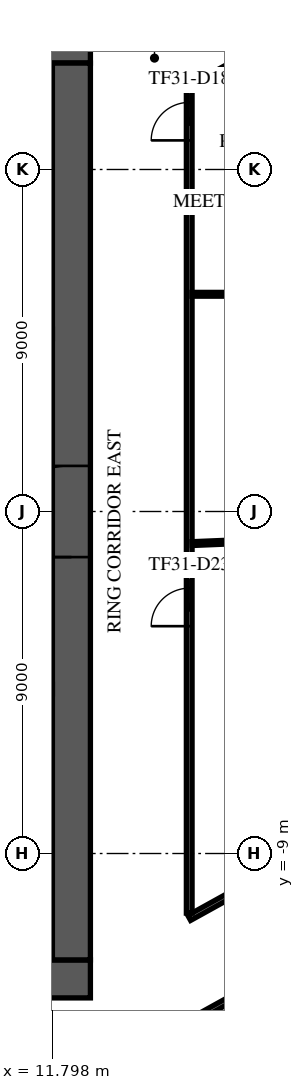
"""IFC4 building model, lengths in metres.
Left out: names, types, materials, properties, quantities, classifications, styles, units other than length and angle.
Written with IfcOpenShell. Run it as: python <this file> out.ifc"""

import sys

from ifc_helpers import new_model, si_unit, direction, frame, frame_2d, origin, place, context, subcontext, project, spatial, rectangle, extrude, element, fill, save


model = new_model("IFC4")
c1 = context("Model", 3, precision=1e-05, world=origin(), true_north=direction((0.0, 1.0)))
c2 = subcontext(c1, "Body", "Model", "MODEL_VIEW")
j1 = project(units=[si_unit("LENGTHUNIT", "METRE"), si_unit("PLANEANGLEUNIT", "RADIAN")], contexts=[c1])
p1 = place(None, origin())
s1 = spatial("IfcSite", under=j1, at=p1, CompositionType="ELEMENT")
p2 = place(p1, origin())
s2 = spatial("IfcBuilding", under=s1, at=p2, CompositionType="ELEMENT")
p3 = place(p2, frame((0.0, 0.0, 139.7)))
s3 = spatial("IfcBuildingStorey", under=s2, at=p3, CompositionType="ELEMENT", Elevation=139.7)
p4 = place(p3, frame((-12.8, 12.3, 0.0), z_axis=(0.0, 0.0, 1.0), x_axis=(1.0, 0.0, 0.0)))
e1 = element("IfcWall", 1, at=p4, inside=s3, PredefinedType="SHEAR", context=c2, shape_type="SweptSolid", body=[
    extrude(rectangle(XDim=25.6, YDim=1.0, at=frame_2d((12.8, 0.0))), origin(), (0.0, 0.0, 1.0), 3.6),
])
p5 = place(p4, frame((11.6, 0.0, 0.0)))
e2 = element("IfcOpeningElement", 2, at=p5, cuts=e1, PredefinedType="OPENING", context=c2, shape_type="SweptSolid", body=[
    extrude(rectangle(XDim=2.4, YDim=2.4, at=frame_2d((1.2, 1.2))), frame((0.0, 0.51, 0.0), z_axis=(0.0, -1.0, 0.0), x_axis=(1.0, 0.0, 0.0)), (0.0, 0.0, 1.0), 1.02),
])
p6 = place(p4, frame((22.425, 0.0, 0.0)))
e3 = element("IfcOpeningElement", 3, at=p6, cuts=e1, PredefinedType="OPENING", context=c2, shape_type="SweptSolid", body=[
    extrude(rectangle(XDim=1.2, YDim=2.1, at=frame_2d((0.6, 1.05))), frame((0.0, 0.51, 0.0), z_axis=(0.0, -1.0, 0.0), x_axis=(1.0, 0.0, 0.0)), (0.0, 0.0, 1.0), 1.02),
])
p7 = place(p4, frame((1.4, 0.0, 0.0)))
e4 = element("IfcOpeningElement", 4, at=p7, cuts=e1, PredefinedType="OPENING", context=c2, shape_type="SweptSolid", body=[
    extrude(rectangle(XDim=1.0, YDim=2.1, at=frame_2d((0.5, 1.05))), frame((0.0, 0.51, 0.0), z_axis=(0.0, -1.0, 0.0), x_axis=(1.0, 0.0, 0.0)), (0.0, 0.0, 1.0), 1.02),
])
p8 = place(p3, frame((-12.8, -12.3, 0.0), z_axis=(0.0, 0.0, 1.0), x_axis=(1.0, 0.0, 0.0)))
e5 = element("IfcWall", 5, at=p8, inside=s3, PredefinedType="SHEAR", context=c2, shape_type="SweptSolid", body=[
    extrude(rectangle(XDim=25.6, YDim=1.0, at=frame_2d((12.8, 0.0))), origin(), (0.0, 0.0, 1.0), 3.6),
])
p9 = place(p8, frame((7.7, 0.0, 0.0)))
e6 = element("IfcOpeningElement", 6, at=p9, cuts=e5, PredefinedType="OPENING", context=c2, shape_type="SweptSolid", body=[
    extrude(rectangle(XDim=2.0, YDim=2.1, at=frame_2d((1.0, 1.05))), frame((0.0, 0.51, 0.0), z_axis=(0.0, -1.0, 0.0), x_axis=(1.0, 0.0, 0.0)), (0.0, 0.0, 1.0), 1.02),
])
p10 = place(p8, frame((17.825, 0.0, 0.0)))
e7 = element("IfcOpeningElement", 7, at=p10, cuts=e5, PredefinedType="OPENING", context=c2, shape_type="SweptSolid", body=[
    extrude(rectangle(XDim=1.2, YDim=2.1, at=frame_2d((0.6, 1.05))), frame((0.0, 0.51, 0.0), z_axis=(0.0, -1.0, 0.0), x_axis=(1.0, 0.0, 0.0)), (0.0, 0.0, 1.0), 1.02),
])
p11 = place(p8, frame((1.975, 0.0, 0.0)))
e8 = element("IfcOpeningElement", 8, at=p11, cuts=e5, PredefinedType="OPENING", context=c2, shape_type="SweptSolid", body=[
    extrude(rectangle(XDim=1.2, YDim=2.1, at=frame_2d((0.6, 1.05))), frame((0.0, 0.51, 0.0), z_axis=(0.0, -1.0, 0.0), x_axis=(1.0, 0.0, 0.0)), (0.0, 0.0, 1.0), 1.02),
])
p12 = place(p8, frame((22.425, 0.0, 0.0)))
e9 = element("IfcOpeningElement", 9, at=p12, cuts=e5, PredefinedType="OPENING", context=c2, shape_type="SweptSolid", body=[
    extrude(rectangle(XDim=1.2, YDim=2.1, at=frame_2d((0.6, 1.05))), frame((0.0, 0.51, 0.0), z_axis=(0.0, -1.0, 0.0), x_axis=(1.0, 0.0, 0.0)), (0.0, 0.0, 1.0), 1.02),
])
p13 = place(p3, frame((12.3, -11.8, 0.0), z_axis=(0.0, 0.0, 1.0), x_axis=(0.0, 1.0, 0.0)))
e10 = element("IfcWall", 10, at=p13, inside=s3, PredefinedType="SHEAR", context=c2, shape_type="SweptSolid", body=[
    extrude(rectangle(XDim=23.6, YDim=1.0, at=frame_2d((11.8, 0.0))), origin(), (0.0, 0.0, 1.0), 3.6),
])
p14 = place(p13, frame((10.6, 0.0, 0.0)))
e11 = element("IfcOpeningElement", 11, at=p14, cuts=e10, PredefinedType="OPENING", context=c2, shape_type="SweptSolid", body=[
    extrude(rectangle(XDim=2.4, YDim=2.4, at=frame_2d((1.2, 1.2))), frame((0.0, 0.51, 0.0), z_axis=(0.0, -1.0, 0.0), x_axis=(1.0, 0.0, 0.0)), (0.0, 0.0, 1.0), 1.02),
])
for number, where, z_axis, x_axis in (
    (12, (8.65, 4.675, 0.0), (0.0, 0.0, 1.0), (1.0, 0.0, 0.0)),
    (13, (8.65, -4.675, 0.0), (0.0, 0.0, 1.0), (1.0, 0.0, 0.0)),
):
    element("IfcWall", number, at=place(p3, frame(where, z_axis=z_axis, x_axis=x_axis)), inside=s3, PredefinedType="SOLIDWALL", context=c2, shape_type="SweptSolid", body=[
        extrude(rectangle(XDim=3.15, YDim=0.25, at=frame_2d((1.575, 0.0))), origin(), (0.0, 0.0, 1.0), 3.6),
    ])
p15 = place(p3, frame((-9.103, -34.888, 0.0), z_axis=(0.0, 0.0, 1.0), x_axis=(0.874618897425, 0.484811081007, 0.0)))
e14 = element("IfcWall", 14, at=p15, inside=s3, PredefinedType="STANDARD", context=c2, shape_type="SweptSolid", body=[
    extrude(rectangle(XDim=49.751, YDim=0.6, at=frame_2d((24.876, 0.0))), origin(), (0.0, 0.0, 1.0), 3.6),
])
p16 = place(p15, frame((1.161, 0.0, 0.9)))
e15 = element("IfcOpeningElement", 15, at=p16, cuts=e14, PredefinedType="OPENING", context=c2, shape_type="SweptSolid", body=[
    extrude(rectangle(XDim=2.1, YDim=2.1, at=frame_2d((1.05, 1.05))), frame((0.0, 0.31, 0.0), z_axis=(0.0, -1.0, 0.0), x_axis=(1.0, 0.0, 0.0)), (0.0, 0.0, 1.0), 0.62),
])
p17 = place(p15, frame((5.644, 0.0, 0.9)))
e16 = element("IfcOpeningElement", 16, at=p17, cuts=e14, PredefinedType="OPENING", context=c2, shape_type="SweptSolid", body=[
    extrude(rectangle(XDim=2.1, YDim=2.1, at=frame_2d((1.05, 1.05))), frame((0.0, 0.31, 0.0), z_axis=(0.0, -1.0, 0.0), x_axis=(1.0, 0.0, 0.0)), (0.0, 0.0, 1.0), 0.62),
])
p18 = place(p15, frame((10.189, 0.0, 0.9)))
e17 = element("IfcOpeningElement", 17, at=p18, cuts=e14, PredefinedType="OPENING", context=c2, shape_type="SweptSolid", body=[
    extrude(rectangle(XDim=2.1, YDim=2.1, at=frame_2d((1.05, 1.05))), frame((0.0, 0.31, 0.0), z_axis=(0.0, -1.0, 0.0), x_axis=(1.0, 0.0, 0.0)), (0.0, 0.0, 1.0), 0.62),
])
p19 = place(p15, frame((14.735, 0.0, 0.9)))
e18 = element("IfcOpeningElement", 18, at=p19, cuts=e14, PredefinedType="OPENING", context=c2, shape_type="SweptSolid", body=[
    extrude(rectangle(XDim=2.1, YDim=2.1, at=frame_2d((1.05, 1.05))), frame((0.0, 0.31, 0.0), z_axis=(0.0, -1.0, 0.0), x_axis=(1.0, 0.0, 0.0)), (0.0, 0.0, 1.0), 0.62),
])
p20 = place(p15, frame((19.28, 0.0, 0.9)))
e19 = element("IfcOpeningElement", 19, at=p20, cuts=e14, PredefinedType="OPENING", context=c2, shape_type="SweptSolid", body=[
    extrude(rectangle(XDim=2.1, YDim=2.1, at=frame_2d((1.05, 1.05))), frame((0.0, 0.31, 0.0), z_axis=(0.0, -1.0, 0.0), x_axis=(1.0, 0.0, 0.0)), (0.0, 0.0, 1.0), 0.62),
])
p21 = place(p15, frame((23.826, 0.0, 0.9)))
e20 = element("IfcOpeningElement", 20, at=p21, cuts=e14, PredefinedType="OPENING", context=c2, shape_type="SweptSolid", body=[
    extrude(rectangle(XDim=2.1, YDim=2.1, at=frame_2d((1.05, 1.05))), frame((0.0, 0.31, 0.0), z_axis=(0.0, -1.0, 0.0), x_axis=(1.0, 0.0, 0.0)), (0.0, 0.0, 1.0), 0.62),
])
p22 = place(p15, frame((28.371, 0.0, 0.9)))
e21 = element("IfcOpeningElement", 21, at=p22, cuts=e14, PredefinedType="OPENING", context=c2, shape_type="SweptSolid", body=[
    extrude(rectangle(XDim=2.1, YDim=2.1, at=frame_2d((1.05, 1.05))), frame((0.0, 0.31, 0.0), z_axis=(0.0, -1.0, 0.0), x_axis=(1.0, 0.0, 0.0)), (0.0, 0.0, 1.0), 0.62),
])
p23 = place(p15, frame((32.917, 0.0, 0.9)))
e22 = element("IfcOpeningElement", 22, at=p23, cuts=e14, PredefinedType="OPENING", context=c2, shape_type="SweptSolid", body=[
    extrude(rectangle(XDim=2.1, YDim=2.1, at=frame_2d((1.05, 1.05))), frame((0.0, 0.31, 0.0), z_axis=(0.0, -1.0, 0.0), x_axis=(1.0, 0.0, 0.0)), (0.0, 0.0, 1.0), 0.62),
])
p24 = place(p15, frame((37.462, 0.0, 0.9)))
e23 = element("IfcOpeningElement", 23, at=p24, cuts=e14, PredefinedType="OPENING", context=c2, shape_type="SweptSolid", body=[
    extrude(rectangle(XDim=2.1, YDim=2.1, at=frame_2d((1.05, 1.05))), frame((0.0, 0.31, 0.0), z_axis=(0.0, -1.0, 0.0), x_axis=(1.0, 0.0, 0.0)), (0.0, 0.0, 1.0), 0.62),
])
p25 = place(p15, frame((42.008, 0.0, 0.9)))
e24 = element("IfcOpeningElement", 24, at=p25, cuts=e14, PredefinedType="OPENING", context=c2, shape_type="SweptSolid", body=[
    extrude(rectangle(XDim=2.1, YDim=2.1, at=frame_2d((1.05, 1.05))), frame((0.0, 0.31, 0.0), z_axis=(0.0, -1.0, 0.0), x_axis=(1.0, 0.0, 0.0)), (0.0, 0.0, 1.0), 0.62),
])
p26 = place(p15, frame((46.491, 0.0, 0.9)))
e25 = element("IfcOpeningElement", 25, at=p26, cuts=e14, PredefinedType="OPENING", context=c2, shape_type="SweptSolid", body=[
    extrude(rectangle(XDim=2.1, YDim=2.1, at=frame_2d((1.05, 1.05))), frame((0.0, 0.31, 0.0), z_axis=(0.0, -1.0, 0.0), x_axis=(1.0, 0.0, 0.0)), (0.0, 0.0, 1.0), 0.62),
])
p27 = place(p3, frame((36.291, -4.209, 0.0), z_axis=(0.0, 0.0, 1.0), x_axis=(-0.484811111615, 0.874618880458, 0.0)))
e26 = element("IfcWall", 26, at=p27, inside=s3, PredefinedType="STANDARD", context=c2, shape_type="SweptSolid", body=[
    extrude(rectangle(XDim=42.176, YDim=0.6, at=frame_2d((21.088, 0.0))), origin(), (0.0, 0.0, 1.0), 3.6),
])
p28 = place(p27, frame((1.138, 0.0, 0.9)))
e27 = element("IfcOpeningElement", 27, at=p28, cuts=e26, PredefinedType="OPENING", context=c2, shape_type="SweptSolid", body=[
    extrude(rectangle(XDim=2.3, YDim=2.1, at=frame_2d((1.15, 1.05))), frame((0.0, 0.31, 0.0), z_axis=(0.0, -1.0, 0.0), x_axis=(1.0, 0.0, 0.0)), (0.0, 0.0, 1.0), 0.62),
])
p29 = place(p27, frame((5.776, 0.0, 0.9)))
e28 = element("IfcOpeningElement", 28, at=p29, cuts=e26, PredefinedType="OPENING", context=c2, shape_type="SweptSolid", body=[
    extrude(rectangle(XDim=2.3, YDim=2.1, at=frame_2d((1.15, 1.05))), frame((0.0, 0.31, 0.0), z_axis=(0.0, -1.0, 0.0), x_axis=(1.0, 0.0, 0.0)), (0.0, 0.0, 1.0), 0.62),
])
p30 = place(p27, frame((15.176, 0.0, 0.9)))
e29 = element("IfcOpeningElement", 29, at=p30, cuts=e26, PredefinedType="OPENING", context=c2, shape_type="SweptSolid", body=[
    extrude(rectangle(XDim=2.3, YDim=2.1, at=frame_2d((1.15, 1.05))), frame((0.0, 0.31, 0.0), z_axis=(0.0, -1.0, 0.0), x_axis=(1.0, 0.0, 0.0)), (0.0, 0.0, 1.0), 0.62),
])
p31 = place(p27, frame((19.876, 0.0, 0.9)))
e30 = element("IfcOpeningElement", 30, at=p31, cuts=e26, PredefinedType="OPENING", context=c2, shape_type="SweptSolid", body=[
    extrude(rectangle(XDim=2.3, YDim=2.1, at=frame_2d((1.15, 1.05))), frame((0.0, 0.31, 0.0), z_axis=(0.0, -1.0, 0.0), x_axis=(1.0, 0.0, 0.0)), (0.0, 0.0, 1.0), 0.62),
])
p32 = place(p27, frame((24.576, 0.0, 0.9)))
e31 = element("IfcOpeningElement", 31, at=p32, cuts=e26, PredefinedType="OPENING", context=c2, shape_type="SweptSolid", body=[
    extrude(rectangle(XDim=2.3, YDim=2.1, at=frame_2d((1.15, 1.05))), frame((0.0, 0.31, 0.0), z_axis=(0.0, -1.0, 0.0), x_axis=(1.0, 0.0, 0.0)), (0.0, 0.0, 1.0), 0.62),
])
p33 = place(p27, frame((29.276, 0.0, 0.9)))
e32 = element("IfcOpeningElement", 32, at=p33, cuts=e26, PredefinedType="OPENING", context=c2, shape_type="SweptSolid", body=[
    extrude(rectangle(XDim=2.3, YDim=2.1, at=frame_2d((1.15, 1.05))), frame((0.0, 0.31, 0.0), z_axis=(0.0, -1.0, 0.0), x_axis=(1.0, 0.0, 0.0)), (0.0, 0.0, 1.0), 0.62),
])
p34 = place(p27, frame((33.976, 0.0, 0.9)))
e33 = element("IfcOpeningElement", 33, at=p34, cuts=e26, PredefinedType="OPENING", context=c2, shape_type="SweptSolid", body=[
    extrude(rectangle(XDim=2.3, YDim=2.1, at=frame_2d((1.15, 1.05))), frame((0.0, 0.31, 0.0), z_axis=(0.0, -1.0, 0.0), x_axis=(1.0, 0.0, 0.0)), (0.0, 0.0, 1.0), 0.62),
])
p35 = place(p27, frame((38.676, 0.0, 0.9)))
e34 = element("IfcOpeningElement", 34, at=p35, cuts=e26, PredefinedType="OPENING", context=c2, shape_type="SweptSolid", body=[
    extrude(rectangle(XDim=2.3, YDim=2.1, at=frame_2d((1.15, 1.05))), frame((0.0, 0.31, 0.0), z_axis=(0.0, -1.0, 0.0), x_axis=(1.0, 0.0, 0.0)), (0.0, 0.0, 1.0), 0.62),
])
p36 = place(p3, frame((-4.484, -24.462, 0.0), z_axis=(0.0, 0.0, 1.0), x_axis=(0.874618059696, 0.484812592301, 0.0)))
e35 = element("IfcWall", 35, at=p36, inside=s3, PredefinedType="PARTITIONING", context=c2, shape_type="SweptSolid", body=[
    extrude(rectangle(XDim=31.638, YDim=0.15, at=frame_2d((15.819, 0.0))), origin(), (0.0, 0.0, 1.0), 3.15),
])
p37 = place(p36, frame((9.25, 0.0, 0.0)))
e36 = element("IfcOpeningElement", 36, at=p37, cuts=e35, PredefinedType="OPENING", context=c2, shape_type="SweptSolid", body=[
    extrude(rectangle(XDim=1.0, YDim=2.1, at=frame_2d((0.5, 1.05))), frame((0.0, 0.085, 0.0), z_axis=(0.0, -1.0, 0.0), x_axis=(1.0, 0.0, 0.0)), (0.0, 0.0, 1.0), 0.17),
])
p38 = place(p36, frame((19.239, 0.0, 0.0)))
e37 = element("IfcOpeningElement", 37, at=p38, cuts=e35, PredefinedType="OPENING", context=c2, shape_type="SweptSolid", body=[
    extrude(rectangle(XDim=1.0, YDim=2.1, at=frame_2d((0.5, 1.05))), frame((0.0, 0.085, 0.0), z_axis=(0.0, -1.0, 0.0), x_axis=(1.0, 0.0, 0.0)), (0.0, 0.0, 1.0), 0.17),
])
p39 = place(p36, frame((24.772, 0.0, 0.0)))
e38 = element("IfcOpeningElement", 38, at=p39, cuts=e35, PredefinedType="OPENING", context=c2, shape_type="SweptSolid", body=[
    extrude(rectangle(XDim=1.0, YDim=2.1, at=frame_2d((0.5, 1.05))), frame((0.0, 0.085, 0.0), z_axis=(0.0, -1.0, 0.0), x_axis=(1.0, 0.0, 0.0)), (0.0, 0.0, 1.0), 0.17),
])
p40 = place(p3, frame((14.639, 20.66, 0.0), z_axis=(0.0, 0.0, 1.0), x_axis=(0.484803020703, -0.874623365294, 0.0)))
e39 = element("IfcWall", 39, at=p40, inside=s3, PredefinedType="PARTITIONING", context=c2, shape_type="SweptSolid", body=[
    extrude(rectangle(XDim=22.02, YDim=0.15, at=frame_2d((11.01, 0.0))), origin(), (0.0, 0.0, 1.0), 3.15),
])
p41 = place(p40, frame((10.083, 0.0, 0.0)))
e40 = element("IfcOpeningElement", 40, at=p41, cuts=e39, PredefinedType="OPENING", context=c2, shape_type="SweptSolid", body=[
    extrude(rectangle(XDim=1.0, YDim=2.1, at=frame_2d((0.5, 1.05))), frame((0.0, 0.085, 0.0), z_axis=(0.0, -1.0, 0.0), x_axis=(1.0, 0.0, 0.0)), (0.0, 0.0, 1.0), 0.17),
])
p42 = place(p3, frame((15.4, -10.695, 0.0), z_axis=(0.0, 0.0, 1.0), x_axis=(0.874623752953, 0.484802321334, 0.0)))
e41 = element("IfcWall", 41, at=p42, inside=s3, PredefinedType="PARTITIONING", context=c2, shape_type="SweptSolid", body=[
    extrude(rectangle(XDim=7.573, YDim=0.15, at=frame_2d((3.786, 0.0))), origin(), (0.0, 0.0, 1.0), 3.15),
])
p43 = place(p42, frame((2.55, 0.0, 0.0)))
e42 = element("IfcOpeningElement", 42, at=p43, cuts=e41, PredefinedType="OPENING", context=c2, shape_type="SweptSolid", body=[
    extrude(rectangle(XDim=1.8, YDim=2.1, at=frame_2d((0.9, 1.05))), frame((0.0, 0.085, 0.0), z_axis=(0.0, -1.0, 0.0), x_axis=(1.0, 0.0, 0.0)), (0.0, 0.0, 1.0), 0.17),
])
p44 = place(p3, frame((15.4, -10.568, 0.0), z_axis=(0.0, 0.0, 1.0), x_axis=(0.0, 1.0, 0.0)))
e43 = element("IfcWall", 43, at=p44, inside=s3, PredefinedType="PARTITIONING", context=c2, shape_type="SweptSolid", body=[
    extrude(rectangle(XDim=21.695, YDim=0.15, at=frame_2d((10.847, 0.0))), origin(), (0.0, 0.0, 1.0), 3.15),
])
p45 = place(p44, frame((20.333, 0.0, 0.0)))
e44 = element("IfcOpeningElement", 44, at=p45, cuts=e43, PredefinedType="OPENING", context=c2, shape_type="SweptSolid", body=[
    extrude(rectangle(XDim=1.0, YDim=2.1, at=frame_2d((0.5, 1.05))), frame((0.0, 0.085, 0.0), z_axis=(0.0, -1.0, 0.0), x_axis=(1.0, 0.0, 0.0)), (0.0, 0.0, 1.0), 0.17),
])
p46 = place(p44, frame((7.55, 0.0, 0.0)))
e45 = element("IfcOpeningElement", 45, at=p46, cuts=e43, PredefinedType="OPENING", context=c2, shape_type="SweptSolid", body=[
    extrude(rectangle(XDim=1.0, YDim=2.1, at=frame_2d((0.5, 1.05))), frame((0.0, 0.085, 0.0), z_axis=(0.0, -1.0, 0.0), x_axis=(1.0, 0.0, 0.0)), (0.0, 0.0, 1.0), 0.17),
])
p47 = place(p3, frame((15.511, 11.189, 0.0), z_axis=(0.0, 0.0, 1.0), x_axis=(0.874559677803, 0.484917900227, 0.0)))
e46 = element("IfcWall", 46, at=p47, inside=s3, PredefinedType="PARTITIONING", context=c2, shape_type="SweptSolid", body=[
    extrude(rectangle(XDim=1.43, YDim=0.15, at=frame_2d((0.715, 0.0))), origin(), (0.0, 0.0, 1.0), 3.6),
])
p48 = place(p3, frame((15.475, 5.716, 0.0), z_axis=(0.0, 0.0, 1.0), x_axis=(1.0, 0.0, 0.0)))
e47 = element("IfcWall", 47, at=p48, inside=s3, PredefinedType="PARTITIONING", context=c2, shape_type="SweptSolid", body=[
    extrude(rectangle(XDim=4.59, YDim=0.1, at=frame_2d((2.295, 0.0))), origin(), (0.0, 0.0, 1.0), 3.03),
])
p49 = place(p3, frame((15.477, -0.845, 0.0), z_axis=(0.0, 0.0, 1.0), x_axis=(0.999139523849, 0.041475437099, 0.0)))
e48 = element("IfcWall", 48, at=p49, inside=s3, PredefinedType="PARTITIONING", context=c2, shape_type="SweptSolid", body=[
    extrude(rectangle(XDim=18.201, YDim=0.1, at=frame_2d((9.1, 0.0))), origin(), (0.0, 0.0, 1.0), 3.6),
])
p50 = place(p14, origin())
e49 = element("IfcDoor", 49, at=p50, inside=s3, OperationType="SINGLE_SWING_LEFT", PredefinedType="DOOR", context=c2, shape_type="SweptSolid", body=[
    extrude(rectangle(XDim=2.4, YDim=2.4, at=frame_2d((1.2, 1.2))), frame((0.0, 0.025, 0.0), z_axis=(0.0, -1.0, 0.0), x_axis=(1.0, 0.0, 0.0)), (0.0, 0.0, 1.0), 0.05),
])
fill(e11, e49)
p51 = place(p45, frame((1.0, 0.0, 0.0), z_axis=(0.0, 0.0, 1.0), x_axis=(-1.0, 0.0, 0.0)))
e50 = element("IfcDoor", 50, at=p51, inside=s3, OperationType="SINGLE_SWING_LEFT", PredefinedType="DOOR", context=c2, shape_type="SweptSolid", body=[
    extrude(rectangle(XDim=1.0, YDim=2.1, at=frame_2d((0.5, 1.05))), frame((0.0, 0.025, 0.0), z_axis=(0.0, -1.0, 0.0), x_axis=(1.0, 0.0, 0.0)), (0.0, 0.0, 1.0), 0.05),
])
fill(e44, e50)
p52 = place(p46, frame((1.0, 0.0, 0.0), z_axis=(0.0, 0.0, 1.0), x_axis=(-1.0, 0.0, 0.0)))
e51 = element("IfcDoor", 51, at=p52, inside=s3, OperationType="SINGLE_SWING_RIGHT", PredefinedType="DOOR", context=c2, shape_type="SweptSolid", body=[
    extrude(rectangle(XDim=1.0, YDim=2.1, at=frame_2d((0.5, 1.05))), frame((0.0, 0.025, 0.0), z_axis=(0.0, -1.0, 0.0), x_axis=(1.0, 0.0, 0.0)), (0.0, 0.0, 1.0), 0.05),
])
fill(e45, e51)
save(model, sys.argv[1])
